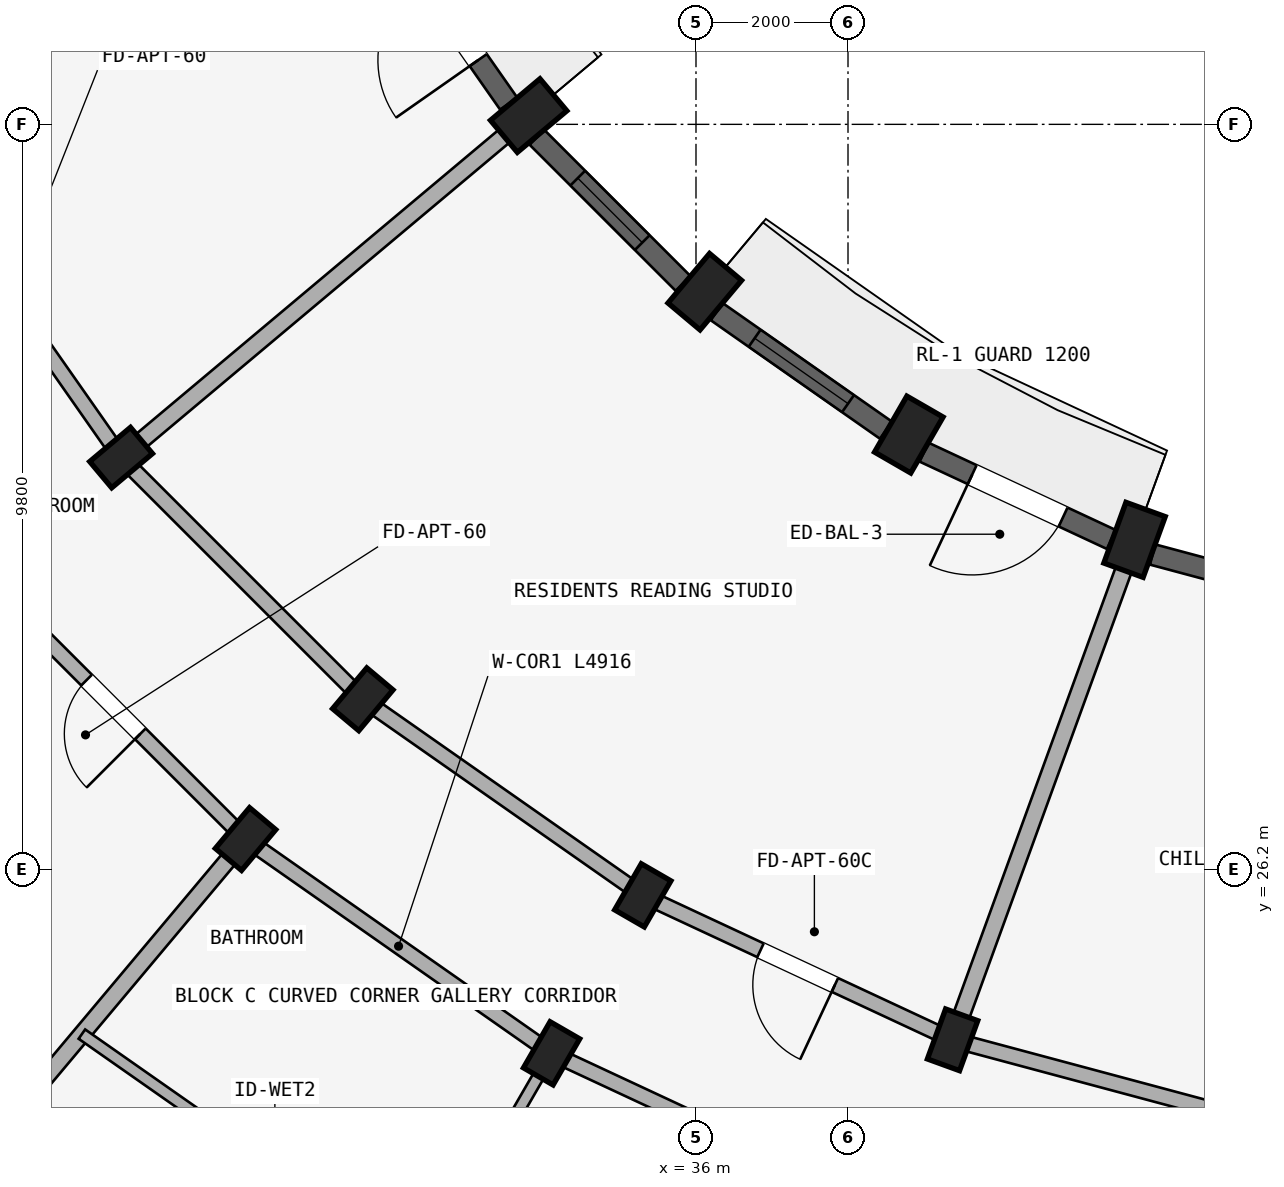
"""IFC4 building model, lengths in metres.
Left out: names, types, materials, properties, quantities, classifications, styles, units other than length and angle.
Written with IfcOpenShell. Run it as: python <this file> out.ifc"""

import sys

from ifc_helpers import new_model, si_unit, direction, frame, frame_2d, origin, origin_2d, place, context, subcontext, project, spatial, rectangle, extrude, element, fill, save


model = new_model("IFC4")
c1 = context("Model", 3, precision=1e-05, world=origin(), true_north=direction((0.0, 1.0)))
c2 = subcontext(c1, "Body", "Model", "MODEL_VIEW")
j1 = project(units=[si_unit("LENGTHUNIT", "METRE"), si_unit("PLANEANGLEUNIT", "RADIAN")], contexts=[c1])
p1 = place(None, origin())
s1 = spatial("IfcSite", under=j1, at=p1, CompositionType="ELEMENT")
p2 = place(p1, origin())
s2 = spatial("IfcBuilding", under=s1, at=p2, CompositionType="ELEMENT")
p3 = place(p2, frame((0.0, 0.0, 15.0)))
s3 = spatial("IfcBuildingStorey", under=s2, at=p3, CompositionType="ELEMENT", Elevation=15.0)
p4 = place(p3, frame((41.77, 30.534, 0.0), z_axis=(0.0, 0.0, 1.0), x_axis=(-0.939692620786, 0.342020143326, 0.0)))
e1 = element("IfcColumn", 1, at=p4, inside=s3, PredefinedType="COLUMN", context=c2, shape_type="SweptSolid", body=[
    extrude(rectangle(XDim=0.55, YDim=0.85, at=origin_2d()), origin(), (0.0, 0.0, 1.0), 2.93),
])
p5 = place(p3, frame((39.376, 23.956, 0.0), z_axis=(0.0, 0.0, 1.0), x_axis=(-0.939692620786, 0.342020143326, 0.0)))
e2 = element("IfcColumn", 2, at=p5, inside=s3, PredefinedType="COLUMN", context=c2, shape_type="SweptSolid", body=[
    extrude(rectangle(XDim=0.45, YDim=0.7, at=origin_2d()), origin(), (0.0, 0.0, 1.0), 2.93),
])
p6 = place(p3, frame((38.8, 31.919, 0.0), z_axis=(0.0, 0.0, 1.0), x_axis=(-0.866025403784, 0.5, 0.0)))
e3 = element("IfcColumn", 3, at=p6, inside=s3, PredefinedType="COLUMN", context=c2, shape_type="SweptSolid", body=[
    extrude(rectangle(XDim=0.55, YDim=0.85, at=origin_2d()), origin(), (0.0, 0.0, 1.0), 2.93),
])
for number, where, z_axis, x_axis in (
    (4, (35.3, 25.856, 0.0), (0.0, 0.0, 1.0), (-0.866, 0.5, 0.0)),
    (5, (34.1, 23.778, 0.0), (0.0, 0.0, 1.0), (-0.866, 0.5, 0.0)),
):
    element("IfcColumn", number, at=place(p3, frame(where, z_axis=z_axis, x_axis=x_axis)), inside=s3, PredefinedType="COLUMN", context=c2, shape_type="SweptSolid", body=[
        extrude(rectangle(XDim=0.45, YDim=0.7, at=origin_2d()), origin(), (0.0, 0.0, 1.0), 2.93),
    ])
p7 = place(p3, frame((36.115, 33.798, 0.0), z_axis=(0.0, 0.0, 1.0), x_axis=(-0.766044443119, 0.642787609687, 0.0)))
e6 = element("IfcColumn", 6, at=p7, inside=s3, PredefinedType="COLUMN", context=c2, shape_type="SweptSolid", body=[
    extrude(rectangle(XDim=0.55, YDim=0.85, at=origin_2d()), origin(), (0.0, 0.0, 1.0), 2.93),
])
for number, where, z_axis, x_axis in (
    (7, (31.616, 28.436, 0.0), (0.0, 0.0, 1.0), (-0.766, 0.643, 0.0)),
    (8, (30.073, 26.598, 0.0), (0.0, 0.0, 1.0), (-0.766, 0.643, 0.0)),
):
    element("IfcColumn", number, at=place(p3, frame(where, z_axis=z_axis, x_axis=x_axis)), inside=s3, PredefinedType="COLUMN", context=c2, shape_type="SweptSolid", body=[
        extrude(rectangle(XDim=0.45, YDim=0.7, at=origin_2d()), origin(), (0.0, 0.0, 1.0), 2.93),
    ])
p8 = place(p3, frame((33.798, 36.115, 0.0), z_axis=(0.0, 0.0, 1.0), x_axis=(-0.642787609687, 0.766044443119, 0.0)))
e9 = element("IfcColumn", 9, at=p8, inside=s3, PredefinedType="COLUMN", context=c2, shape_type="SweptSolid", body=[
    extrude(rectangle(XDim=0.55, YDim=0.85, at=origin_2d()), origin(), (0.0, 0.0, 1.0), 2.93),
])
p9 = place(p3, frame((28.436, 31.616, 0.0), z_axis=(0.0, 0.0, 1.0), x_axis=(-0.642787609687, 0.766044443119, 0.0)))
e10 = element("IfcColumn", 10, at=p9, inside=s3, PredefinedType="COLUMN", context=c2, shape_type="SweptSolid", body=[
    extrude(rectangle(XDim=0.45, YDim=0.7, at=origin_2d()), origin(), (0.0, 0.0, 1.0), 2.93),
])
p10 = place(p3, frame((43.72, 22.792, 0.0), z_axis=(0.0, 0.0, 1.0), x_axis=(-0.965934240054, 0.258787642463, 0.0)))
e11 = element("IfcWall", 11, at=p10, inside=s3, PredefinedType="STANDARD", context=c2, shape_type="SweptSolid", body=[
    extrude(rectangle(XDim=4.497, YDim=0.2, at=frame_2d((2.249, 0.0))), origin(), (0.0, 0.0, 1.0), 2.372),
])
p11 = place(p3, frame((39.376, 23.956, 0.0), z_axis=(0.0, 0.0, 1.0), x_axis=(-0.906307919131, 0.422617978463, 0.0)))
e12 = element("IfcWall", 12, at=p11, inside=s3, PredefinedType="STANDARD", context=c2, shape_type="SweptSolid", body=[
    extrude(rectangle(XDim=4.497, YDim=0.2, at=frame_2d((2.249, 0.0))), origin(), (0.0, 0.0, 1.0), 2.372),
])
p12 = place(p11, frame((1.709, 0.0, 0.0)))
e13 = element("IfcOpeningElement", 13, at=p12, cuts=e12, PredefinedType="OPENING", context=c2, shape_type="SweptSolid", body=[
    extrude(rectangle(XDim=1.08, YDim=2.15, at=frame_2d((0.54, 1.075))), frame((0.0, 0.11, 0.0), z_axis=(0.0, -1.0, 0.0), x_axis=(1.0, 0.0, 0.0)), (0.0, 0.0, 1.0), 0.22),
])
p13 = place(p3, frame((38.555, 21.701, 0.0), z_axis=(0.0, 0.0, 1.0), x_axis=(-0.906302381024, 0.422629854778, 0.0)))
e14 = element("IfcWall", 14, at=p13, inside=s3, PredefinedType="STANDARD", context=c2, shape_type="SweptSolid", body=[
    extrude(rectangle(XDim=4.915, YDim=0.2, at=frame_2d((2.458, 0.0))), origin(), (0.0, 0.0, 1.0), 2.372),
])
p14 = place(p3, frame((35.3, 25.856, 0.0), z_axis=(0.0, 0.0, 1.0), x_axis=(-0.819155404658, 0.573571637217, 0.0)))
e15 = element("IfcWall", 15, at=p14, inside=s3, PredefinedType="STANDARD", context=c2, shape_type="SweptSolid", body=[
    extrude(rectangle(XDim=4.497, YDim=0.2, at=frame_2d((2.249, 0.0))), origin(), (0.0, 0.0, 1.0), 2.372),
])
p15 = place(p3, frame((34.1, 23.778, 0.0), z_axis=(0.0, 0.0, 1.0), x_axis=(-0.819140911474, 0.573592335331, 0.0)))
e16 = element("IfcWall", 16, at=p15, inside=s3, PredefinedType="STANDARD", context=c2, shape_type="SweptSolid", body=[
    extrude(rectangle(XDim=4.916, YDim=0.2, at=frame_2d((2.458, 0.0))), origin(), (0.0, 0.0, 1.0), 2.372),
])
p16 = place(p3, frame((31.616, 28.436, 0.0), z_axis=(0.0, 0.0, 1.0), x_axis=(-0.707106781187, 0.707106781187, 0.0)))
e17 = element("IfcWall", 17, at=p16, inside=s3, PredefinedType="STANDARD", context=c2, shape_type="SweptSolid", body=[
    extrude(rectangle(XDim=4.497, YDim=0.2, at=frame_2d((2.249, 0.0))), origin(), (0.0, 0.0, 1.0), 2.372),
])
p17 = place(p3, frame((30.073, 26.598, 0.0), z_axis=(0.0, 0.0, 1.0), x_axis=(-0.707106781187, 0.707106781187, 0.0)))
e18 = element("IfcWall", 18, at=p17, inside=s3, PredefinedType="STANDARD", context=c2, shape_type="SweptSolid", body=[
    extrude(rectangle(XDim=4.916, YDim=0.2, at=frame_2d((2.458, 0.0))), origin(), (0.0, 0.0, 1.0), 2.372),
])
p18 = place(p17, frame((1.958, 0.0, 0.0)))
e19 = element("IfcOpeningElement", 19, at=p18, cuts=e18, PredefinedType="OPENING", context=c2, shape_type="SweptSolid", body=[
    extrude(rectangle(XDim=1.0, YDim=2.15, at=frame_2d((0.5, 1.075))), frame((0.0, 0.11, 0.0), z_axis=(0.0, -1.0, 0.0), x_axis=(1.0, 0.0, 0.0)), (0.0, 0.0, 1.0), 0.22),
])
p19 = place(p3, frame((28.436, 31.616, 0.0), z_axis=(0.0, 0.0, 1.0), x_axis=(-0.573571637217, 0.819155404658, 0.0)))
e20 = element("IfcWall", 20, at=p19, inside=s3, PredefinedType="STANDARD", context=c2, shape_type="SweptSolid", body=[
    extrude(rectangle(XDim=4.497, YDim=0.2, at=frame_2d((2.249, 0.0))), origin(), (0.0, 0.0, 1.0), 2.372),
])
p20 = place(p19, frame((1.749, 0.0, 0.0)))
e21 = element("IfcOpeningElement", 21, at=p20, cuts=e20, PredefinedType="OPENING", context=c2, shape_type="SweptSolid", body=[
    extrude(rectangle(XDim=1.0, YDim=2.15, at=frame_2d((0.5, 1.075))), frame((0.0, 0.11, 0.0), z_axis=(0.0, -1.0, 0.0), x_axis=(1.0, 0.0, 0.0)), (0.0, 0.0, 1.0), 0.22),
])
p21 = place(p3, frame((41.702, 30.346, 0.0), z_axis=(0.0, 0.0, 1.0), x_axis=(-0.342010221662, -0.939696231917, 0.0)))
e22 = element("IfcWall", 22, at=p21, inside=s3, PredefinedType="STANDARD", context=c2, shape_type="SweptSolid", body=[
    extrude(rectangle(XDim=6.75, YDim=0.22, at=frame_2d((3.375, 0.0))), origin(), (0.0, 0.0, 1.0), 2.372),
])
p22 = place(p3, frame((34.05, 23.691, 0.0), z_axis=(0.0, 0.0, 1.0), x_axis=(-0.499997843263, -0.866026648973, 0.0)))
e23 = element("IfcWall", 23, at=p22, inside=s3, PredefinedType="PARTITIONING", context=c2, shape_type="SweptSolid", body=[
    extrude(rectangle(XDim=17.42, YDim=0.15, at=frame_2d((8.71, 0.0))), origin(), (0.0, 0.0, 1.0), 2.372),
])
p23 = place(p22, frame((7.5, 0.0, 0.0)))
e24 = element("IfcOpeningElement", 24, at=p23, cuts=e23, PredefinedType="OPENING", context=c2, shape_type="SweptSolid", body=[
    extrude(rectangle(XDim=0.8, YDim=2.1, at=frame_2d((0.4, 1.05))), frame((0.0, 0.085, 0.0), z_axis=(0.0, -1.0, 0.0), x_axis=(1.0, 0.0, 0.0)), (0.0, 0.0, 1.0), 0.17),
])
p24 = place(p3, frame((30.009, 26.521, 0.0), z_axis=(0.0, 0.0, 1.0), x_axis=(-0.642784757967, -0.766046835987, 0.0)))
e25 = element("IfcWall", 25, at=p24, inside=s3, PredefinedType="STANDARD", context=c2, shape_type="SweptSolid", body=[
    extrude(rectangle(XDim=17.42, YDim=0.22, at=frame_2d((8.71, 0.0))), origin(), (0.0, 0.0, 1.0), 2.372),
])
p25 = place(p3, frame((33.645, 35.987, 0.0), z_axis=(0.0, 0.0, 1.0), x_axis=(-0.766046761698, -0.642784846501, 0.0)))
e26 = element("IfcWall", 26, at=p25, inside=s3, PredefinedType="STANDARD", context=c2, shape_type="SweptSolid", body=[
    extrude(rectangle(XDim=6.75, YDim=0.22, at=frame_2d((3.375, 0.0))), origin(), (0.0, 0.0, 1.0), 2.372),
])
p26 = place(p3, frame((32.425, 20.877, 0.0), z_axis=(0.0, 0.0, 1.0), x_axis=(-0.819156831143, 0.573569599955, 0.0)))
e27 = element("IfcWall", 27, at=p26, inside=s3, PredefinedType="PLUMBINGWALL", context=c2, shape_type="SweptSolid", body=[
    extrude(rectangle(XDim=5.5, YDim=0.15, at=frame_2d((2.75, 0.0))), origin(), (0.0, 0.0, 1.0), 2.372),
])
p27 = place(p26, frame((2.33, 0.0, 0.0)))
e28 = element("IfcOpeningElement", 28, at=p27, cuts=e27, PredefinedType="OPENING", context=c2, shape_type="SweptSolid", body=[
    extrude(rectangle(XDim=0.84, YDim=2.1, at=frame_2d((0.42, 1.05))), frame((0.0, 0.085, 0.0), z_axis=(0.0, -1.0, 0.0), x_axis=(1.0, 0.0, 0.0)), (0.0, 0.0, 1.0), 0.17),
])
p28 = place(p3, frame((44.633, 29.637, 0.0), z_axis=(0.0, 0.0, 1.0), x_axis=(-0.965925595341, 0.258819907011, 0.0)))
e29 = element("IfcWall", 29, at=p28, inside=s3, PredefinedType="STANDARD", context=c2, shape_type="SweptSolid", body=[
    extrude(rectangle(XDim=2.718, YDim=0.275, at=frame_2d((1.359, 0.0))), origin(), (0.0, 0.0, 1.0), 2.472),
])
p29 = place(p28, frame((0.759, 0.0, 0.772)))
e30 = element("IfcOpeningElement", 30, at=p29, cuts=e29, PredefinedType="OPENING", context=c2, shape_type="SweptSolid", body=[
    extrude(rectangle(XDim=1.2, YDim=1.5, at=frame_2d((0.6, 0.75))), frame((0.0, 0.147, 0.0), z_axis=(0.0, -1.0, 0.0), x_axis=(1.0, 0.0, 0.0)), (0.0, 0.0, 1.0), 0.295),
])
p30 = place(p3, frame((41.464, 30.539, 0.0), z_axis=(0.0, 0.0, 1.0), x_axis=(-0.906311629168, 0.422610022166, 0.0)))
e31 = element("IfcWall", 31, at=p30, inside=s3, PredefinedType="STANDARD", context=c2, shape_type="SweptSolid", body=[
    extrude(rectangle(XDim=2.718, YDim=0.275, at=frame_2d((1.359, 0.0))), origin(), (0.0, 0.0, 1.0), 2.472),
])
p31 = place(p30, frame((0.699, 0.0, 0.0)))
e32 = element("IfcOpeningElement", 32, at=p31, cuts=e31, PredefinedType="OPENING", context=c2, shape_type="SweptSolid", body=[
    extrude(rectangle(XDim=1.32, YDim=2.15, at=frame_2d((0.66, 1.075))), frame((0.0, 0.147, 0.0), z_axis=(0.0, -1.0, 0.0), x_axis=(1.0, 0.0, 0.0)), (0.0, 0.0, 1.0), 0.295),
])
p32 = place(p3, frame((38.499, 31.977, 0.0), z_axis=(0.0, 0.0, 1.0), x_axis=(-0.81917282593, 0.573546755948, 0.0)))
e33 = element("IfcWall", 33, at=p32, inside=s3, PredefinedType="STANDARD", context=c2, shape_type="SweptSolid", body=[
    extrude(rectangle(XDim=2.718, YDim=0.275, at=frame_2d((1.359, 0.0))), origin(), (0.0, 0.0, 1.0), 2.472),
])
p33 = place(p32, frame((0.609, 0.0, 0.622)))
e34 = element("IfcOpeningElement", 34, at=p33, cuts=e33, PredefinedType="OPENING", context=c2, shape_type="SweptSolid", body=[
    extrude(rectangle(XDim=1.5, YDim=1.65, at=frame_2d((0.75, 0.825))), frame((0.0, 0.147, 0.0), z_axis=(0.0, -1.0, 0.0), x_axis=(1.0, 0.0, 0.0)), (0.0, 0.0, 1.0), 0.295),
])
p34 = place(p3, frame((35.829, 33.908, 0.0), z_axis=(0.0, 0.0, 1.0), x_axis=(-0.707106781187, 0.707106781187, 0.0)))
e35 = element("IfcWall", 35, at=p34, inside=s3, PredefinedType="STANDARD", context=c2, shape_type="SweptSolid", body=[
    extrude(rectangle(XDim=2.718, YDim=0.275, at=frame_2d((1.359, 0.0))), origin(), (0.0, 0.0, 1.0), 2.472),
])
p35 = place(p34, frame((0.759, 0.0, 0.772)))
e36 = element("IfcOpeningElement", 36, at=p35, cuts=e35, PredefinedType="OPENING", context=c2, shape_type="SweptSolid", body=[
    extrude(rectangle(XDim=1.2, YDim=1.5, at=frame_2d((0.6, 0.75))), frame((0.0, 0.147, 0.0), z_axis=(0.0, -1.0, 0.0), x_axis=(1.0, 0.0, 0.0)), (0.0, 0.0, 1.0), 0.295),
])
p36 = place(p3, frame((33.535, 36.273, 0.0), z_axis=(0.0, 0.0, 1.0), x_axis=(-0.573546755948, 0.81917282593, 0.0)))
e37 = element("IfcWall", 37, at=p36, inside=s3, PredefinedType="STANDARD", context=c2, shape_type="SweptSolid", body=[
    extrude(rectangle(XDim=2.718, YDim=0.275, at=frame_2d((1.359, 0.0))), origin(), (0.0, 0.0, 1.0), 2.472),
])
p37 = place(p36, frame((0.699, 0.0, 0.0)))
e38 = element("IfcOpeningElement", 38, at=p37, cuts=e37, PredefinedType="OPENING", context=c2, shape_type="SweptSolid", body=[
    extrude(rectangle(XDim=1.32, YDim=2.15, at=frame_2d((0.66, 1.075))), frame((0.0, 0.147, 0.0), z_axis=(0.0, -1.0, 0.0), x_axis=(1.0, 0.0, 0.0)), (0.0, 0.0, 1.0), 0.295),
])
p38 = place(p33, origin())
e39 = element("IfcWindow", 39, at=p38, inside=s3, PartitioningType="DOUBLE_PANEL_VERTICAL", PredefinedType="WINDOW", context=c2, shape_type="SweptSolid", body=[
    extrude(rectangle(XDim=1.5, YDim=1.65, at=frame_2d((0.75, 0.825))), frame((0.0, 0.03, 0.0), z_axis=(0.0, -1.0, 0.0), x_axis=(1.0, 0.0, 0.0)), (0.0, 0.0, 1.0), 0.06),
])
fill(e34, e39)
p39 = place(p35, origin())
e40 = element("IfcWindow", 40, at=p39, inside=s3, PartitioningType="SINGLE_PANEL", PredefinedType="WINDOW", context=c2, shape_type="SweptSolid", body=[
    extrude(rectangle(XDim=1.2, YDim=1.5, at=frame_2d((0.6, 0.75))), frame((0.0, 0.03, 0.0), z_axis=(0.0, -1.0, 0.0), x_axis=(1.0, 0.0, 0.0)), (0.0, 0.0, 1.0), 0.06),
])
fill(e36, e40)
p40 = place(p18, frame((1.0, 0.0, 0.0), z_axis=(0.0, 0.0, 1.0), x_axis=(-1.0, 0.0, 0.0)))
e41 = element("IfcDoor", 41, at=p40, inside=s3, OperationType="SINGLE_SWING_RIGHT", PredefinedType="DOOR", context=c2, shape_type="SweptSolid", body=[
    extrude(rectangle(XDim=1.0, YDim=2.15, at=frame_2d((0.5, 1.075))), frame((0.0, 0.025, 0.0), z_axis=(0.0, -1.0, 0.0), x_axis=(1.0, 0.0, 0.0)), (0.0, 0.0, 1.0), 0.05),
])
fill(e19, e41)
p41 = place(p12, origin())
e42 = element("IfcDoor", 42, at=p41, inside=s3, OperationType="SINGLE_SWING_LEFT", PredefinedType="DOOR", context=c2, shape_type="SweptSolid", body=[
    extrude(rectangle(XDim=1.08, YDim=2.15, at=frame_2d((0.54, 1.075))), frame((0.0, 0.025, 0.0), z_axis=(0.0, -1.0, 0.0), x_axis=(1.0, 0.0, 0.0)), (0.0, 0.0, 1.0), 0.05),
])
fill(e13, e42)
p42 = place(p31, frame((1.32, 0.0, 0.0), z_axis=(0.0, 0.0, 1.0), x_axis=(-1.0, 0.0, 0.0)))
e43 = element("IfcDoor", 43, at=p42, inside=s3, OperationType="SINGLE_SWING_LEFT", PredefinedType="DOOR", context=c2, shape_type="SweptSolid", body=[
    extrude(rectangle(XDim=1.32, YDim=2.15, at=frame_2d((0.66, 1.075))), frame((0.0, 0.025, 0.0), z_axis=(0.0, -1.0, 0.0), x_axis=(1.0, 0.0, 0.0)), (0.0, 0.0, 1.0), 0.05),
])
fill(e32, e43)
p43 = place(p37, frame((1.32, 0.0, 0.0), z_axis=(0.0, 0.0, 1.0), x_axis=(-1.0, 0.0, 0.0)))
e44 = element("IfcDoor", 44, at=p43, inside=s3, OperationType="SINGLE_SWING_RIGHT", PredefinedType="DOOR", context=c2, shape_type="SweptSolid", body=[
    extrude(rectangle(XDim=1.32, YDim=2.15, at=frame_2d((0.66, 1.075))), frame((0.0, 0.025, 0.0), z_axis=(0.0, -1.0, 0.0), x_axis=(1.0, 0.0, 0.0)), (0.0, 0.0, 1.0), 0.05),
])
fill(e38, e44)
save(model, sys.argv[1])
